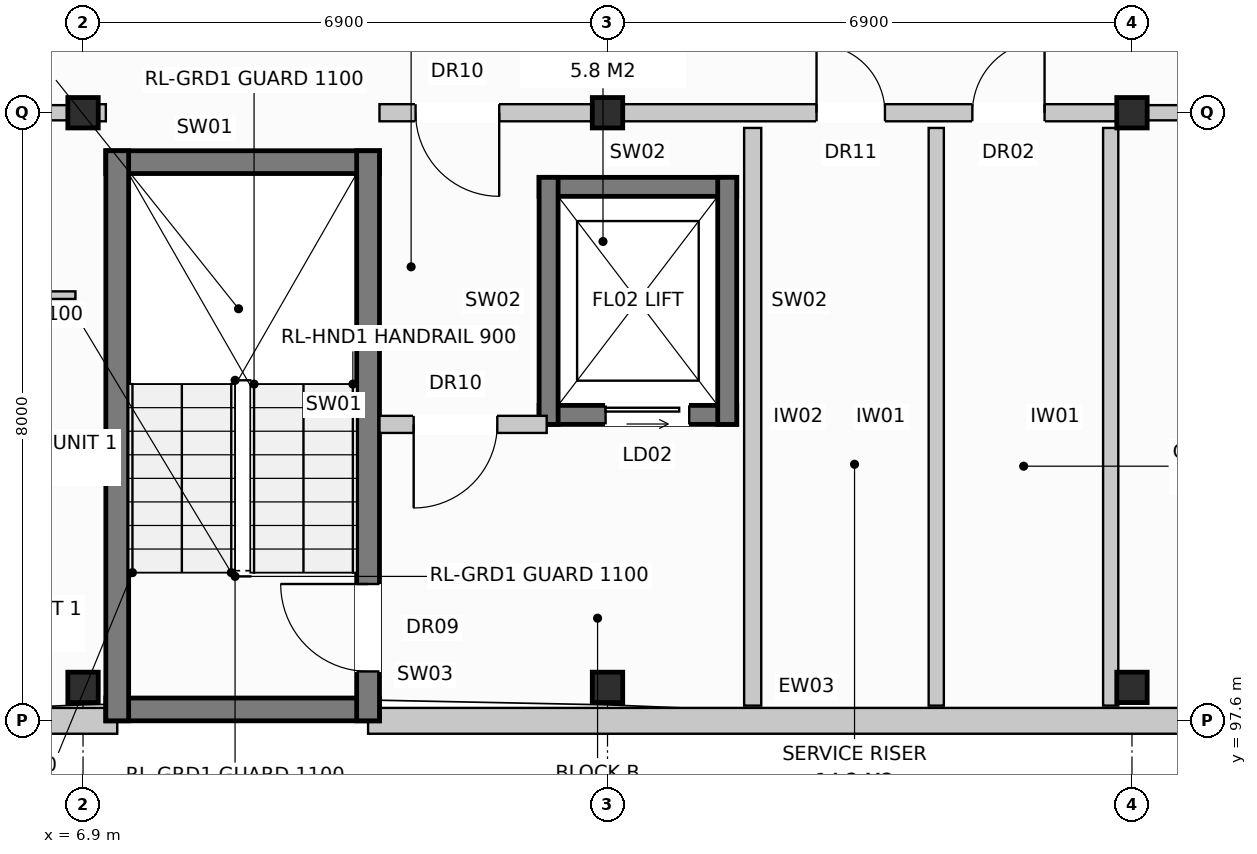
"""IFC4 building model, lengths in metres.
Left out: names, types, materials, properties, quantities, classifications, styles, units other than length and angle.
Written with IfcOpenShell. Run it as: python <this file> out.ifc"""

import sys

from ifc_helpers import new_model, si_unit, direction, frame, frame_2d, origin, origin_with_axes, origin_2d, place, context, subcontext, project, spatial, rectangle, extrude, element, fill, save


model = new_model("IFC4")
c1 = context("Model", 3, precision=1e-05, world=origin(), true_north=direction((0.0, 1.0)))
c2 = subcontext(c1, "Body", "Model", "MODEL_VIEW")
j1 = project(units=[si_unit("LENGTHUNIT", "METRE"), si_unit("PLANEANGLEUNIT", "RADIAN")], contexts=[c1])
p1 = place(None, origin())
s1 = spatial("IfcSite", under=j1, at=p1, CompositionType="ELEMENT")
p2 = place(p1, origin())
s2 = spatial("IfcBuilding", under=s1, at=p2, CompositionType="ELEMENT")
p3 = place(p2, frame((0.0, 0.0, 36.8)))
s3 = spatial("IfcBuildingStorey", under=s2, at=p3, CompositionType="ELEMENT", Elevation=36.8)
for number, where, z_axis, x_axis in (
    (1, (6.9, 98.04, 0.0), (0.0, 0.0, 1.0), (1.0, 0.0, 0.0)),
    (2, (6.9, 105.6, 0.0), (0.0, 0.0, 1.0), (1.0, 0.0, 0.0)),
    (3, (13.8, 98.04, 0.0), (0.0, 0.0, 1.0), (1.0, 0.0, 0.0)),
    (4, (13.8, 105.6, 0.0), (0.0, 0.0, 1.0), (1.0, 0.0, 0.0)),
    (5, (20.7, 98.04, 0.0), (0.0, 0.0, 1.0), (1.0, 0.0, 0.0)),
    (6, (20.7, 105.6, 0.0), (0.0, 0.0, 1.0), (1.0, 0.0, 0.0)),
):
    element("IfcColumn", number, at=place(p3, frame(where, z_axis=z_axis, x_axis=x_axis)), inside=s3, PredefinedType="COLUMN", context=c2, shape_type="SweptSolid", body=[
        extrude(rectangle(XDim=0.4, YDim=0.4, at=origin_2d()), origin(), (0.0, 0.0, 1.0), 3.2),
    ])
p4 = place(p3, frame((0.16, 97.6, 0.0), z_axis=(0.0, 0.0, 1.0), x_axis=(1.0, 0.0, 0.0)))
e7 = element("IfcWall", 7, at=p4, inside=s3, PredefinedType="STANDARD", context=c2, shape_type="SweptSolid", body=[
    extrude(rectangle(XDim=7.19, YDim=0.34, at=frame_2d((3.595, 0.0))), origin(), (0.0, 0.0, 1.0), 2.97),
])
p5 = place(p4, frame((0.86, 0.0, 0.8)))
e8 = element("IfcOpeningElement", 8, at=p5, cuts=e7, PredefinedType="OPENING", context=c2, shape_type="SweptSolid", body=[
    extrude(rectangle(XDim=1.9, YDim=1.85, at=frame_2d((0.95, 0.925))), frame((0.0, 0.182, 0.0), z_axis=(0.0, -1.0, 0.0), x_axis=(1.0, 0.0, 0.0)), (0.0, 0.0, 1.0), 0.364),
])
p6 = place(p4, frame((4.66, 0.0, 0.72)))
e9 = element("IfcOpeningElement", 9, at=p6, cuts=e7, PredefinedType="OPENING", context=c2, shape_type="SweptSolid", body=[
    extrude(rectangle(XDim=1.1, YDim=1.5, at=frame_2d((0.55, 0.75))), frame((0.0, 0.182, 0.0), z_axis=(0.0, -1.0, 0.0), x_axis=(1.0, 0.0, 0.0)), (0.0, 0.0, 1.0), 0.364),
])
p7 = place(p3, frame((10.65, 97.6, 0.0), z_axis=(0.0, 0.0, 1.0), x_axis=(1.0, 0.0, 0.0)))
e10 = element("IfcWall", 10, at=p7, inside=s3, PredefinedType="STANDARD", context=c2, shape_type="SweptSolid", body=[
    extrude(rectangle(XDim=17.4, YDim=0.34, at=frame_2d((8.7, 0.0))), origin(), (0.0, 0.0, 1.0), 2.97),
])
p8 = place(p7, frame((11.841, 0.0, 0.0)))
e11 = element("IfcOpeningElement", 11, at=p8, cuts=e10, PredefinedType="OPENING", context=c2, shape_type="SweptSolid", body=[
    extrude(rectangle(XDim=1.05, YDim=2.12, at=frame_2d((0.525, 1.06))), frame((0.0, 0.182, 0.0), z_axis=(0.0, -1.0, 0.0), x_axis=(1.0, 0.0, 0.0)), (0.0, 0.0, 1.0), 0.364),
])
p9 = place(p7, frame((14.87, 0.0, 0.72)))
e12 = element("IfcOpeningElement", 12, at=p9, cuts=e10, PredefinedType="OPENING", context=c2, shape_type="SweptSolid", body=[
    extrude(rectangle(XDim=1.1, YDim=1.5, at=frame_2d((0.55, 0.75))), frame((0.0, 0.182, 0.0), z_axis=(0.0, -1.0, 0.0), x_axis=(1.0, 0.0, 0.0)), (0.0, 0.0, 1.0), 0.364),
])
for number, where, z_axis, x_axis in (
    (13, (7.2, 97.75, 0.0), (0.0, 0.0, 1.0), (1.0, 0.0, 0.0)),
    (14, (7.2, 104.95, 0.0), (0.0, 0.0, 1.0), (1.0, 0.0, 0.0)),
):
    element("IfcWall", number, at=place(p3, frame(where, z_axis=z_axis, x_axis=x_axis)), inside=s3, PredefinedType="SHEAR", context=c2, shape_type="SweptSolid", body=[
        extrude(rectangle(XDim=3.6, YDim=0.3, at=frame_2d((1.8, 0.0))), origin(), (0.0, 0.0, 1.0), 2.97),
    ])
p10 = place(p3, frame((7.35, 97.6, 0.0), z_axis=(0.0, 0.0, 1.0), x_axis=(0.0, 1.0, 0.0)))
e15 = element("IfcWall", 15, at=p10, inside=s3, PredefinedType="SHEAR", context=c2, shape_type="SweptSolid", body=[
    extrude(rectangle(XDim=7.5, YDim=0.3, at=frame_2d((3.75, 0.0))), origin(), (0.0, 0.0, 1.0), 2.97),
])
p11 = place(p3, frame((10.65, 97.6, 0.0), z_axis=(0.0, 0.0, 1.0), x_axis=(0.0, 1.0, 0.0)))
e16 = element("IfcWall", 16, at=p11, inside=s3, PredefinedType="SHEAR", context=c2, shape_type="SweptSolid", body=[
    extrude(rectangle(XDim=7.5, YDim=0.3, at=frame_2d((3.75, 0.0))), origin(), (0.0, 0.0, 1.0), 2.97),
])
p12 = place(p11, frame((0.65, 0.0, 0.0)))
e17 = element("IfcOpeningElement", 17, at=p12, cuts=e16, PredefinedType="OPENING", context=c2, shape_type="SweptSolid", body=[
    extrude(rectangle(XDim=1.15, YDim=2.15, at=frame_2d((0.575, 1.075))), frame((0.0, 0.162, 0.0), z_axis=(0.0, -1.0, 0.0), x_axis=(1.0, 0.0, 0.0)), (0.0, 0.0, 1.0), 0.324),
])
p13 = place(p3, frame((12.9, 101.625, 0.0), z_axis=(0.0, 0.0, 1.0), x_axis=(1.0, 0.0, 0.0)))
e18 = element("IfcWall", 18, at=p13, inside=s3, PredefinedType="SHEAR", context=c2, shape_type="SweptSolid", body=[
    extrude(rectangle(XDim=2.6, YDim=0.25, at=frame_2d((1.3, 0.0))), origin(), (0.0, 0.0, 1.0), 2.97),
])
p14 = place(p13, frame((0.875, 0.0, 0.0)))
e19 = element("IfcOpeningElement", 19, at=p14, cuts=e18, PredefinedType="OPENING", context=c2, shape_type="SweptSolid", body=[
    extrude(rectangle(XDim=1.1, YDim=2.1, at=frame_2d((0.55, 1.05))), frame((0.0, 0.137, 0.0), z_axis=(0.0, -1.0, 0.0), x_axis=(1.0, 0.0, 0.0)), (0.0, 0.0, 1.0), 0.274),
])
p15 = place(p3, frame((12.9, 104.625, 0.0), z_axis=(0.0, 0.0, 1.0), x_axis=(1.0, 0.0, 0.0)))
e20 = element("IfcWall", 20, at=p15, inside=s3, PredefinedType="SHEAR", context=c2, shape_type="SweptSolid", body=[
    extrude(rectangle(XDim=2.6, YDim=0.25, at=frame_2d((1.3, 0.0))), origin(), (0.0, 0.0, 1.0), 2.97),
])
for number, where, z_axis, x_axis in (
    (21, (13.025, 101.5, 0.0), (0.0, 0.0, 1.0), (0.0, 1.0, 0.0)),
    (22, (15.375, 101.5, 0.0), (0.0, 0.0, 1.0), (0.0, 1.0, 0.0)),
):
    element("IfcWall", number, at=place(p3, frame(where, z_axis=z_axis, x_axis=x_axis)), inside=s3, PredefinedType="SHEAR", context=c2, shape_type="SweptSolid", body=[
        extrude(rectangle(XDim=3.25, YDim=0.25, at=frame_2d((1.625, 0.0))), origin(), (0.0, 0.0, 1.0), 2.97),
    ])
p16 = place(p3, frame((15.71, 97.8, 0.0), z_axis=(0.0, 0.0, 1.0), x_axis=(0.0, 1.0, 0.0)))
e23 = element("IfcWall", 23, at=p16, inside=s3, PredefinedType="PARTITIONING", context=c2, shape_type="SweptSolid", body=[
    extrude(rectangle(XDim=7.6, YDim=0.225, at=frame_2d((3.8, 0.0))), origin(), (0.0, 0.0, 1.0), 2.59),
])
p17 = place(p3, frame((10.8, 101.5, 0.0), z_axis=(0.0, 0.0, 1.0), x_axis=(1.0, 0.0, 0.0)))
e24 = element("IfcWall", 24, at=p17, inside=s3, PredefinedType="PARTITIONING", context=c2, shape_type="SweptSolid", body=[
    extrude(rectangle(XDim=2.2, YDim=0.225, at=frame_2d((1.1, 0.0))), origin(), (0.0, 0.0, 1.0), 2.97),
])
p18 = place(p17, frame((0.45, 0.0, 0.0)))
e25 = element("IfcOpeningElement", 25, at=p18, cuts=e24, PredefinedType="OPENING", context=c2, shape_type="SweptSolid", body=[
    extrude(rectangle(XDim=1.1, YDim=2.15, at=frame_2d((0.55, 1.075))), frame((0.0, 0.125, 0.0), z_axis=(0.0, -1.0, 0.0), x_axis=(1.0, 0.0, 0.0)), (0.0, 0.0, 1.0), 0.249),
])
p19 = place(p3, frame((6.9, 105.6, 0.0), z_axis=(0.0, 0.0, 1.0), x_axis=(1.0, 0.0, 0.0)))
e26 = element("IfcWall", 26, at=p19, inside=s3, PredefinedType="PARTITIONING", context=c2, shape_type="SweptSolid", body=[
    extrude(rectangle(XDim=0.3, YDim=0.225, at=frame_2d((0.15, 0.0))), origin(), (0.0, 0.0, 1.0), 2.97),
])
p20 = place(p3, frame((18.125, 97.8, 0.0), z_axis=(0.0, 0.0, 1.0), x_axis=(0.0, 1.0, 0.0)))
e27 = element("IfcWall", 27, at=p20, inside=s3, PredefinedType="PARTITIONING", context=c2, shape_type="SweptSolid", body=[
    extrude(rectangle(XDim=7.6, YDim=0.2, at=frame_2d((3.8, 0.0))), origin(), (0.0, 0.0, 1.0), 2.59),
])
p21 = place(p3, frame((20.42, 97.8, 0.0), z_axis=(0.0, 0.0, 1.0), x_axis=(0.0, 1.0, 0.0)))
e28 = element("IfcWall", 28, at=p21, inside=s3, PredefinedType="PARTITIONING", context=c2, shape_type="SweptSolid", body=[
    extrude(rectangle(XDim=7.6, YDim=0.2, at=frame_2d((3.8, 0.0))), origin(), (0.0, 0.0, 1.0), 2.97),
])
p22 = place(p3, frame((10.8, 105.6, 0.0), z_axis=(0.0, 0.0, 1.0), x_axis=(1.0, 0.0, 0.0)))
e29 = element("IfcWall", 29, at=p22, inside=s3, PredefinedType="PARTITIONING", context=c2, shape_type="SweptSolid", body=[
    extrude(rectangle(XDim=9.9, YDim=0.225, at=frame_2d((4.95, 0.0))), origin(), (0.0, 0.0, 1.0), 2.41),
])
p23 = place(p22, frame((0.475, 0.0, 0.0)))
e30 = element("IfcOpeningElement", 30, at=p23, cuts=e29, PredefinedType="OPENING", context=c2, shape_type="SweptSolid", body=[
    extrude(rectangle(XDim=1.1, YDim=2.15, at=frame_2d((0.55, 1.075))), frame((0.0, 0.125, 0.0), z_axis=(0.0, -1.0, 0.0), x_axis=(1.0, 0.0, 0.0)), (0.0, 0.0, 1.0), 0.249),
])
p24 = place(p22, frame((5.75, 0.0, 0.0)))
e31 = element("IfcOpeningElement", 31, at=p24, cuts=e29, PredefinedType="OPENING", context=c2, shape_type="SweptSolid", body=[
    extrude(rectangle(XDim=0.9, YDim=2.1, at=frame_2d((0.45, 1.05))), frame((0.0, 0.125, 0.0), z_axis=(0.0, -1.0, 0.0), x_axis=(1.0, 0.0, 0.0)), (0.0, 0.0, 1.0), 0.249),
])
p25 = place(p22, frame((7.8, 0.0, 0.0)))
e32 = element("IfcOpeningElement", 32, at=p25, cuts=e29, PredefinedType="OPENING", context=c2, shape_type="SweptSolid", body=[
    extrude(rectangle(XDim=0.95, YDim=2.15, at=frame_2d((0.475, 1.075))), frame((0.0, 0.125, 0.0), z_axis=(0.0, -1.0, 0.0), x_axis=(1.0, 0.0, 0.0)), (0.0, 0.0, 1.0), 0.249),
])
p26 = place(p3, frame((0.0, 105.6, 0.0), z_axis=(0.0, 0.0, 1.0), x_axis=(1.0, 0.0, 0.0)))
e33 = element("IfcWall", 33, at=p26, inside=s3, PredefinedType="PARTITIONING", context=c2, shape_type="SweptSolid", body=[
    extrude(rectangle(XDim=6.9, YDim=0.2, at=frame_2d((3.45, 0.0))), origin(), (0.0, 0.0, 1.0), 2.41),
])
p27 = place(p26, frame((2.0, 0.0, 0.0)))
e34 = element("IfcOpeningElement", 34, at=p27, cuts=e33, PredefinedType="OPENING", context=c2, shape_type="SweptSolid", body=[
    extrude(rectangle(XDim=0.95, YDim=2.15, at=frame_2d((0.475, 1.075))), frame((0.0, 0.112, 0.0), z_axis=(0.0, -1.0, 0.0), x_axis=(1.0, 0.0, 0.0)), (0.0, 0.0, 1.0), 0.224),
])
for number, where, z_axis, x_axis in (
    (35, (3.9, 103.2, 0.0), (0.0, 0.0, 1.0), (1.0, 0.0, 0.0)),
    (36, (3.9, 101.1, 0.0), (0.0, 0.0, 1.0), (1.0, 0.0, 0.0)),
):
    element("IfcWall", number, at=place(p3, frame(where, z_axis=z_axis, x_axis=x_axis)), inside=s3, PredefinedType="PARTITIONING", context=c2, shape_type="SweptSolid", body=[
        extrude(rectangle(XDim=2.9, YDim=0.1, at=frame_2d((1.45, 0.0))), origin(), (0.0, 0.0, 1.0), 2.97),
    ])
p28 = place(p3, frame((20.7, 105.6, 0.0), z_axis=(0.0, 0.0, 1.0), x_axis=(1.0, 0.0, 0.0)))
e37 = element("IfcWall", 37, at=p28, inside=s3, PredefinedType="PARTITIONING", context=c2, shape_type="SweptSolid", body=[
    extrude(rectangle(XDim=6.9, YDim=0.2, at=frame_2d((3.45, 0.0))), origin(), (0.0, 0.0, 1.0), 2.41),
])
p29 = place(p28, frame((2.0, 0.0, 0.0)))
e38 = element("IfcOpeningElement", 38, at=p29, cuts=e37, PredefinedType="OPENING", context=c2, shape_type="SweptSolid", body=[
    extrude(rectangle(XDim=0.95, YDim=2.15, at=frame_2d((0.475, 1.075))), frame((0.0, 0.112, 0.0), z_axis=(0.0, -1.0, 0.0), x_axis=(1.0, 0.0, 0.0)), (0.0, 0.0, 1.0), 0.224),
])
p30 = place(p12, origin_with_axes())
e39 = element("IfcDoor", 39, at=p30, inside=s3, OperationType="SINGLE_SWING_RIGHT", PredefinedType="DOOR", context=c2, shape_type="SweptSolid", body=[
    extrude(rectangle(XDim=1.15, YDim=2.15, at=frame_2d((0.575, 1.075))), frame((0.0, 0.025, 0.0), z_axis=(0.0, -1.0, 0.0), x_axis=(1.0, 0.0, 0.0)), (0.0, 0.0, 1.0), 0.05),
])
fill(e17, e39)
p31 = place(p14, origin_with_axes())
e40 = element("IfcDoor", 40, at=p31, inside=s3, OperationType="SLIDING_TO_LEFT", PredefinedType="DOOR", context=c2, shape_type="SweptSolid", body=[
    extrude(rectangle(XDim=1.1, YDim=2.1, at=frame_2d((0.55, 1.05))), frame((0.0, 0.025, 0.0), z_axis=(0.0, -1.0, 0.0), x_axis=(1.0, 0.0, 0.0)), (0.0, 0.0, 1.0), 0.05),
])
fill(e19, e40)
p32 = place(p18, frame((1.1, 0.0, 0.0), z_axis=(0.0, 0.0, 1.0), x_axis=(-1.0, 0.0, 0.0)))
e41 = element("IfcDoor", 41, at=p32, inside=s3, OperationType="SINGLE_SWING_LEFT", PredefinedType="DOOR", context=c2, shape_type="SweptSolid", body=[
    extrude(rectangle(XDim=1.1, YDim=2.15, at=frame_2d((0.55, 1.075))), frame((0.0, 0.025, 0.0), z_axis=(0.0, -1.0, 0.0), x_axis=(1.0, 0.0, 0.0)), (0.0, 0.0, 1.0), 0.05),
])
fill(e25, e41)
p33 = place(p23, frame((1.1, 0.0, 0.0), z_axis=(0.0, 0.0, 1.0), x_axis=(-1.0, 0.0, 0.0)))
e42 = element("IfcDoor", 42, at=p33, inside=s3, OperationType="SINGLE_SWING_RIGHT", PredefinedType="DOOR", context=c2, shape_type="SweptSolid", body=[
    extrude(rectangle(XDim=1.1, YDim=2.15, at=frame_2d((0.55, 1.075))), frame((0.0, 0.025, 0.0), z_axis=(0.0, -1.0, 0.0), x_axis=(1.0, 0.0, 0.0)), (0.0, 0.0, 1.0), 0.05),
])
fill(e30, e42)
p34 = place(p24, origin_with_axes())
e43 = element("IfcDoor", 43, at=p34, inside=s3, OperationType="SINGLE_SWING_LEFT", PredefinedType="DOOR", context=c2, shape_type="SweptSolid", body=[
    extrude(rectangle(XDim=0.9, YDim=2.1, at=frame_2d((0.45, 1.05))), frame((0.0, 0.025, 0.0), z_axis=(0.0, -1.0, 0.0), x_axis=(1.0, 0.0, 0.0)), (0.0, 0.0, 1.0), 0.05),
])
fill(e31, e43)
p35 = place(p25, origin_with_axes())
e44 = element("IfcDoor", 44, at=p35, inside=s3, OperationType="SINGLE_SWING_RIGHT", PredefinedType="DOOR", context=c2, shape_type="SweptSolid", body=[
    extrude(rectangle(XDim=0.95, YDim=2.15, at=frame_2d((0.475, 1.075))), frame((0.0, 0.025, 0.0), z_axis=(0.0, -1.0, 0.0), x_axis=(1.0, 0.0, 0.0)), (0.0, 0.0, 1.0), 0.05),
])
fill(e32, e44)
save(model, sys.argv[1])
